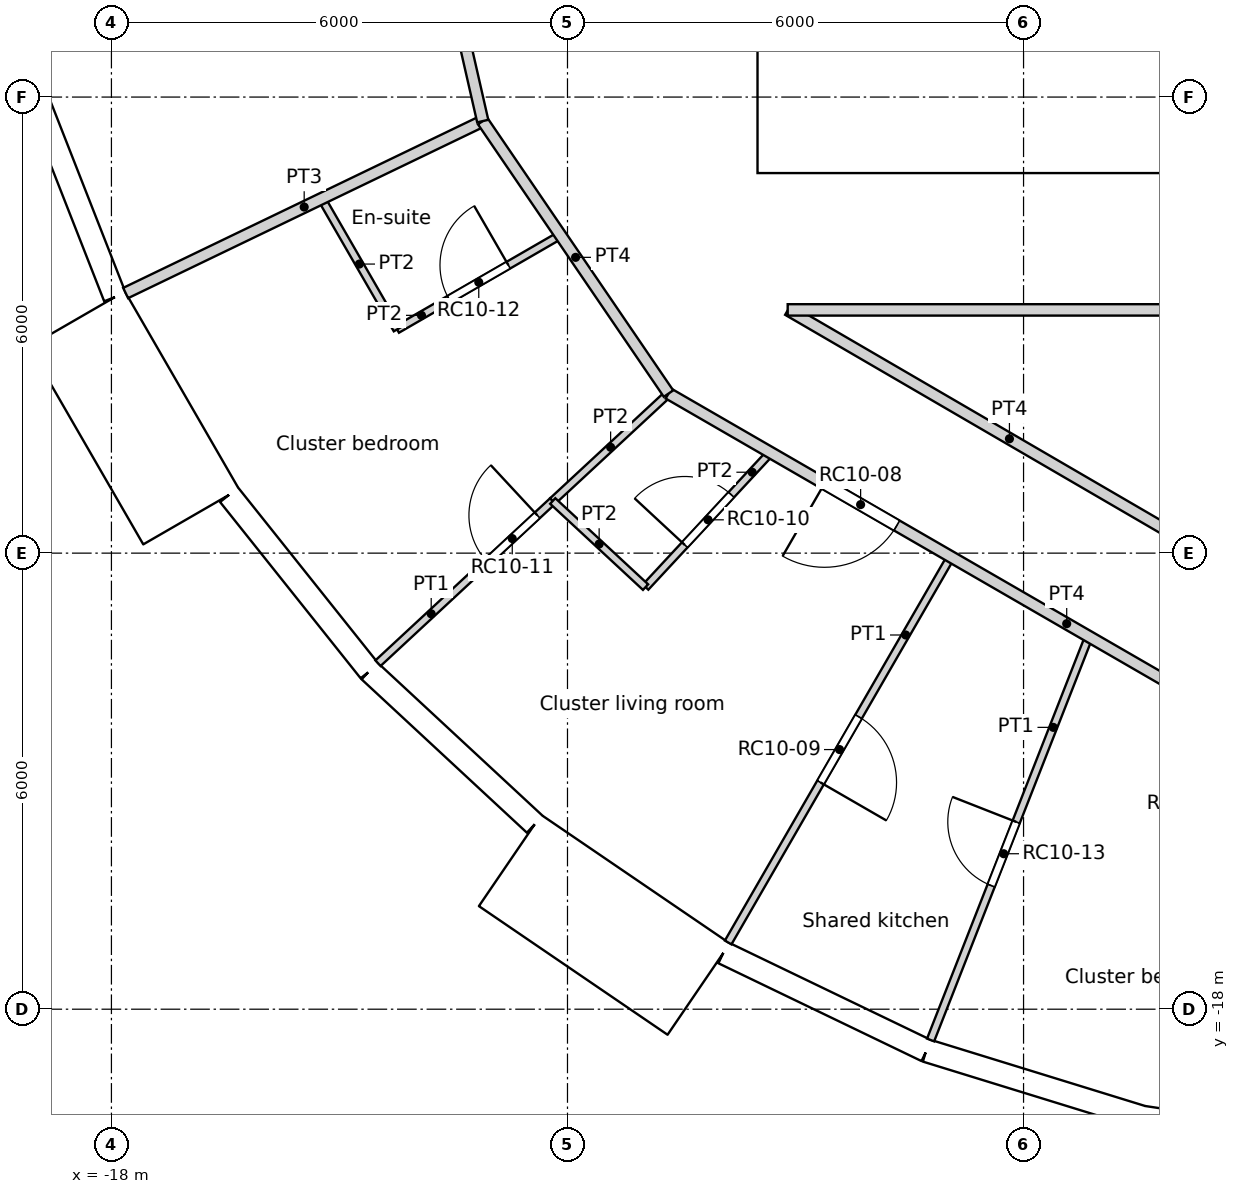
"""IFC4 building model, lengths in metres.
Left out: names, types, materials, properties, quantities, classifications, styles, units other than length and angle.
Written with IfcOpenShell. Run it as: python <this file> out.ifc"""

import sys

from ifc_helpers import new_model, si_unit, direction, frame, frame_2d, origin, origin_2d, place, context, subcontext, project, spatial, rectangle, circle, extrude, element, fill, save


model = new_model("IFC4")
c1 = context("Model", 3, precision=1e-05, world=origin(), true_north=direction((0.0, 1.0)))
c2 = subcontext(c1, "Body", "Model", "MODEL_VIEW")
j1 = project(units=[si_unit("LENGTHUNIT", "METRE"), si_unit("PLANEANGLEUNIT", "RADIAN")], contexts=[c1])
p1 = place(None, origin())
s1 = spatial("IfcSite", under=j1, at=p1, CompositionType="ELEMENT")
p2 = place(p1, origin())
s2 = spatial("IfcBuilding", under=s1, at=p2, CompositionType="ELEMENT")
p3 = place(p2, frame((0.0, 0.0, 323.4)))
s3 = spatial("IfcBuildingStorey", under=s2, at=p3, CompositionType="ELEMENT", Elevation=323.4)
for number, where, z_axis, x_axis in (
    (1, (-16.958, -8.167, 0.0), (0.0, 0.0, 1.0), (1.0, 0.0, 0.0)),
    (2, (-13.798, -12.802, 0.0), (0.0, 0.0, 1.0), (1.0, 0.0, 0.0)),
    (3, (-9.411, -16.301, 0.0), (0.0, 0.0, 1.0), (1.0, 0.0, 0.0)),
    (4, (-4.188, -18.35, 0.0), (0.0, 0.0, 1.0), (1.0, 0.0, 0.0)),
):
    element("IfcColumn", number, at=place(p3, frame(where, z_axis=z_axis, x_axis=x_axis)), inside=s3, PredefinedType="COLUMN", context=c2, shape_type="SweptSolid", body=[
        extrude(circle(Radius=0.45, at=origin_2d()), origin(), (0.0, 0.0, 1.0), 3.6),
    ])
p4 = place(p3, frame((-19.037, -5.872, 0.0), z_axis=(0.0, 0.0, 1.0), x_axis=(0.36530043032, -0.930889679612, 0.0)))
e5 = element("IfcWall", 5, at=p4, inside=s3, PredefinedType="SOLIDWALL", context=c2, shape_type="SweptSolid", body=[
    extrude(rectangle(XDim=2.962, YDim=0.3, at=frame_2d((1.481, 0.0))), origin(), (0.0, 0.0, 1.0), 3.25),
])
p5 = place(p4, frame((1.481, 0.0, 1.55)))
e6 = element("IfcOpeningElement", 6, at=p5, cuts=e5, PredefinedType="OPENING", context=c2, shape_type="SweptSolid", body=[
    extrude(circle(Radius=0.9, at=origin_2d()), frame((0.0, 0.16, 0.0), z_axis=(0.0, -1.0, 0.0), x_axis=(1.0, 0.0, 0.0)), (0.0, 0.0, 1.0), 0.32),
])
p6 = place(p3, frame((-18.452, -8.921, -0.35), z_axis=(0.0, 0.0, 1.0), x_axis=(0.499990139034, -0.866031096941, 0.0)))
e7 = element("IfcWall", 7, at=p6, inside=s3, PredefinedType="ELEMENTEDWALL", context=c2, shape_type="SweptSolid", body=[
    extrude(rectangle(XDim=3.0, YDim=1.45, at=frame_2d((1.5, 0.0))), origin(), (0.0, 0.0, 1.0), 3.6),
])
p7 = place(p6, frame((1.5, 0.0, 1.9)))
e8 = element("IfcOpeningElement", 8, at=p7, cuts=e7, PredefinedType="OPENING", context=c2, shape_type="SweptSolid", body=[
    extrude(circle(Radius=0.9, at=origin_2d()), frame((0.0, 0.735, 0.0), z_axis=(0.0, -1.0, 0.0), x_axis=(1.0, 0.0, 0.0)), (0.0, 0.0, 1.0), 1.47),
])
p8 = place(p3, frame((-16.451, -11.234, 0.0), z_axis=(0.0, 0.0, 1.0), x_axis=(0.623498236992, -0.781824755599, 0.0)))
e9 = element("IfcWall", 9, at=p8, inside=s3, PredefinedType="SOLIDWALL", context=c2, shape_type="SweptSolid", body=[
    extrude(rectangle(XDim=2.962, YDim=0.3, at=frame_2d((1.481, 0.0))), origin(), (0.0, 0.0, 1.0), 3.25),
])
p9 = place(p8, frame((1.481, 0.0, 1.55)))
e10 = element("IfcOpeningElement", 10, at=p9, cuts=e9, PredefinedType="OPENING", context=c2, shape_type="SweptSolid", body=[
    extrude(circle(Radius=0.9, at=origin_2d()), frame((0.0, 0.16, 0.0), z_axis=(0.0, -1.0, 0.0), x_axis=(1.0, 0.0, 0.0)), (0.0, 0.0, 1.0), 0.32),
])
p10 = place(p3, frame((-14.604, -13.55, 0.0), z_axis=(0.0, 0.0, 1.0), x_axis=(0.733066412643, -0.680157066165, 0.0)))
e11 = element("IfcWall", 11, at=p10, inside=s3, PredefinedType="SOLIDWALL", context=c2, shape_type="SweptSolid", body=[
    extrude(rectangle(XDim=2.962, YDim=0.3, at=frame_2d((1.481, 0.0))), origin(), (0.0, 0.0, 1.0), 3.25),
])
p11 = place(p10, frame((1.481, 0.0, 1.55)))
e12 = element("IfcOpeningElement", 12, at=p11, cuts=e11, PredefinedType="OPENING", context=c2, shape_type="SweptSolid", body=[
    extrude(circle(Radius=0.9, at=origin_2d()), frame((0.0, 0.16, 0.0), z_axis=(0.0, -1.0, 0.0), x_axis=(1.0, 0.0, 0.0)), (0.0, 0.0, 1.0), 0.32),
])
p12 = place(p3, frame((-12.754, -16.044, -0.35), z_axis=(0.0, 0.0, 1.0), x_axis=(0.826246281157, -0.563309047392, 0.0)))
e13 = element("IfcWall", 13, at=p12, inside=s3, PredefinedType="ELEMENTEDWALL", context=c2, shape_type="SweptSolid", body=[
    extrude(rectangle(XDim=3.0, YDim=1.45, at=frame_2d((1.5, 0.0))), origin(), (0.0, 0.0, 1.0), 3.6),
])
p13 = place(p12, frame((1.5, 0.0, 1.9)))
e14 = element("IfcOpeningElement", 14, at=p13, cuts=e13, PredefinedType="OPENING", context=c2, shape_type="SweptSolid", body=[
    extrude(circle(Radius=0.9, at=origin_2d()), frame((0.0, 0.735, 0.0), z_axis=(0.0, -1.0, 0.0), x_axis=(1.0, 0.0, 0.0)), (0.0, 0.0, 1.0), 1.47),
])
p14 = place(p3, frame((-9.947, -17.259, 0.0), z_axis=(0.0, 0.0, 1.0), x_axis=(0.900939615635, -0.433944476838, 0.0)))
e15 = element("IfcWall", 15, at=p14, inside=s3, PredefinedType="SOLIDWALL", context=c2, shape_type="SweptSolid", body=[
    extrude(rectangle(XDim=2.962, YDim=0.3, at=frame_2d((1.481, 0.0))), origin(), (0.0, 0.0, 1.0), 3.25),
])
p15 = place(p14, frame((1.481, 0.0, 1.55)))
e16 = element("IfcOpeningElement", 16, at=p15, cuts=e15, PredefinedType="OPENING", context=c2, shape_type="SweptSolid", body=[
    extrude(circle(Radius=0.9, at=origin_2d()), frame((0.0, 0.16, 0.0), z_axis=(0.0, -1.0, 0.0), x_axis=(1.0, 0.0, 0.0)), (0.0, 0.0, 1.0), 0.32),
])
p16 = place(p3, frame((-7.278, -18.545, 0.0), z_axis=(0.0, 0.0, 1.0), x_axis=(0.95558635705, -0.294711238707, 0.0)))
e17 = element("IfcWall", 17, at=p16, inside=s3, PredefinedType="SOLIDWALL", context=c2, shape_type="SweptSolid", body=[
    extrude(rectangle(XDim=2.962, YDim=0.3, at=frame_2d((1.481, 0.0))), origin(), (0.0, 0.0, 1.0), 3.25),
])
p17 = place(p16, frame((1.481, 0.0, 1.55)))
e18 = element("IfcOpeningElement", 18, at=p17, cuts=e17, PredefinedType="OPENING", context=c2, shape_type="SweptSolid", body=[
    extrude(circle(Radius=0.9, at=origin_2d()), frame((0.0, 0.16, 0.0), z_axis=(0.0, -1.0, 0.0), x_axis=(1.0, 0.0, 0.0)), (0.0, 0.0, 1.0), 0.32),
])
p18 = place(p3, frame((-4.53, -19.989, -0.35), z_axis=(0.0, 0.0, 1.0), x_axis=(0.988836445254, -0.149004981587, 0.0)))
e19 = element("IfcWall", 19, at=p18, inside=s3, PredefinedType="ELEMENTEDWALL", context=c2, shape_type="SweptSolid", body=[
    extrude(rectangle(XDim=3.0, YDim=1.45, at=frame_2d((1.5, 0.0))), origin(), (0.0, 0.0, 1.0), 3.6),
])
p19 = place(p18, frame((1.5, 0.0, 1.9)))
e20 = element("IfcOpeningElement", 20, at=p19, cuts=e19, PredefinedType="OPENING", context=c2, shape_type="SweptSolid", body=[
    extrude(circle(Radius=0.9, at=origin_2d()), frame((0.0, 0.735, 0.0), z_axis=(0.0, -1.0, 0.0), x_axis=(1.0, 0.0, 0.0)), (0.0, 0.0, 1.0), 1.47),
])
p20 = place(p3, frame((-9.5, -6.7, 0.0), z_axis=(0.0, 0.0, 1.0), x_axis=(1.0, 0.0, 0.0)))
e21 = element("IfcWall", 21, at=p20, inside=s3, PredefinedType="SOLIDWALL", context=c2, shape_type="SweptSolid", body=[
    extrude(rectangle(XDim=19.0, YDim=0.6, at=frame_2d((9.5, 0.0))), origin(), (0.0, 0.0, 1.0), 3.6),
])
p21 = place(p20, frame((10.4, 0.0, 0.0)))
e22 = element("IfcOpeningElement", 22, at=p21, cuts=e21, PredefinedType="OPENING", context=c2, shape_type="SweptSolid", body=[
    extrude(rectangle(XDim=1.0, YDim=2.1, at=frame_2d((0.5, 1.05))), frame((0.0, 0.3, 0.0), z_axis=(0.0, -1.0, 0.0), x_axis=(1.0, 0.0, 0.0)), (0.0, 0.0, 1.0), 0.6),
])
p22 = place(p20, frame((5.35, 0.0, 0.0)))
e23 = element("IfcOpeningElement", 23, at=p22, cuts=e21, PredefinedType="OPENING", context=c2, shape_type="SweptSolid", body=[
    extrude(rectangle(XDim=1.7, YDim=2.1, at=frame_2d((0.85, 1.05))), frame((0.0, 0.3, 0.0), z_axis=(0.0, -1.0, 0.0), x_axis=(1.0, 0.0, 0.0)), (0.0, 0.0, 1.0), 0.6),
])
p23 = place(p20, frame((11.95, 0.0, 0.0)))
e24 = element("IfcOpeningElement", 24, at=p23, cuts=e21, PredefinedType="OPENING", context=c2, shape_type="SweptSolid", body=[
    extrude(rectangle(XDim=1.7, YDim=2.1, at=frame_2d((0.85, 1.05))), frame((0.0, 0.3, 0.0), z_axis=(0.0, -1.0, 0.0), x_axis=(1.0, 0.0, 0.0)), (0.0, 0.0, 1.0), 0.6),
])
p24 = place(p3, frame((-9.2, -6.4, 0.0), z_axis=(0.0, 0.0, 1.0), x_axis=(0.0, 1.0, 0.0)))
e25 = element("IfcWall", 25, at=p24, inside=s3, PredefinedType="SOLIDWALL", context=c2, shape_type="SweptSolid", body=[
    extrude(rectangle(XDim=12.8, YDim=0.6, at=frame_2d((6.4, 0.0))), origin(), (0.0, 0.0, 1.0), 3.6),
])
p25 = place(p3, frame((-9.103, -8.8, 0.0), z_axis=(0.0, 0.0, 1.0), x_axis=(1.0, 0.0, 0.0)))
e26 = element("IfcWall", 26, at=p25, inside=s3, PredefinedType="PARTITIONING", context=c2, shape_type="SweptSolid", body=[
    extrude(rectangle(XDim=18.204, YDim=0.15, at=frame_2d((9.102, 0.0))), origin(), (0.0, 0.0, 1.0), 3.25),
])
p26 = place(p25, frame((8.597, 0.0, 0.0)))
e27 = element("IfcOpeningElement", 27, at=p26, cuts=e26, PredefinedType="OPENING", context=c2, shape_type="SweptSolid", body=[
    extrude(rectangle(XDim=1.0, YDim=2.04, at=frame_2d((0.5, 1.02))), frame((0.0, 0.075, 0.0), z_axis=(0.0, -1.0, 0.0), x_axis=(1.0, 0.0, 0.0)), (0.0, 0.0, 1.0), 0.15),
])
p27 = place(p3, frame((-9.099, -8.8, 0.0), z_axis=(0.0, 0.0, 1.0), x_axis=(0.864286794128, -0.502999341447, 0.0)))
e28 = element("IfcWall", 28, at=p27, inside=s3, PredefinedType="PARTITIONING", context=c2, shape_type="SweptSolid", body=[
    extrude(rectangle(XDim=6.741, YDim=0.15, at=frame_2d((3.371, 0.0))), origin(), (0.0, 0.0, 1.0), 3.25),
])
p28 = place(p3, frame((-14.557, 0.0, 0.0), z_axis=(0.0, 0.0, 1.0), x_axis=(0.222568978642, -0.97491694505, 0.0)))
e29 = element("IfcWall", 29, at=p28, inside=s3, PredefinedType="PARTITIONING", context=c2, shape_type="SweptSolid", body=[
    extrude(rectangle(XDim=6.479, YDim=0.15, at=frame_2d((3.239, 0.0))), origin(), (0.0, 0.0, 1.0), 3.25),
])
p29 = place(p28, frame((2.74, 0.0, 0.0)))
e30 = element("IfcOpeningElement", 30, at=p29, cuts=e29, PredefinedType="OPENING", context=c2, shape_type="SweptSolid", body=[
    extrude(rectangle(XDim=1.0, YDim=2.04, at=frame_2d((0.5, 1.02))), frame((0.0, 0.075, 0.0), z_axis=(0.0, -1.0, 0.0), x_axis=(1.0, 0.0, 0.0)), (0.0, 0.0, 1.0), 0.15),
])
p30 = place(p3, frame((-10.671, -9.901, 0.0), z_axis=(0.0, 0.0, 1.0), x_axis=(0.865823993551, -0.500348690606, 0.0)))
e31 = element("IfcWall", 31, at=p30, inside=s3, PredefinedType="PARTITIONING", context=c2, shape_type="SweptSolid", body=[
    extrude(rectangle(XDim=8.582, YDim=0.15, at=frame_2d((4.291, 0.0))), origin(), (0.0, 0.0, 1.0), 3.25),
])
p31 = place(p30, frame((2.369, 0.0, 0.0)))
e32 = element("IfcOpeningElement", 32, at=p31, cuts=e31, PredefinedType="OPENING", context=c2, shape_type="SweptSolid", body=[
    extrude(rectangle(XDim=1.1, YDim=2.1, at=frame_2d((0.55, 1.05))), frame((0.0, 0.075, 0.0), z_axis=(0.0, -1.0, 0.0), x_axis=(1.0, 0.0, 0.0)), (0.0, 0.0, 1.0), 0.15),
])
p32 = place(p3, frame((-13.115, -6.316, 0.0), z_axis=(0.0, 0.0, 1.0), x_axis=(0.563434599286, -0.826160669802, 0.0)))
e33 = element("IfcWall", 33, at=p32, inside=s3, PredefinedType="PARTITIONING", context=c2, shape_type="SweptSolid", body=[
    extrude(rectangle(XDim=4.339, YDim=0.15, at=frame_2d((2.169, 0.0))), origin(), (0.0, 0.0, 1.0), 3.25),
])
p33 = place(p3, frame((-17.813, -8.578, 0.0), z_axis=(0.0, 0.0, 1.0), x_axis=(0.9009772659, 0.433866300064, 0.0)))
e34 = element("IfcWall", 34, at=p33, inside=s3, PredefinedType="PARTITIONING", context=c2, shape_type="SweptSolid", body=[
    extrude(rectangle(XDim=5.214, YDim=0.15, at=frame_2d((2.607, 0.0))), origin(), (0.0, 0.0, 1.0), 3.25),
])
p34 = place(p3, frame((-9.886, -17.122, 0.0), z_axis=(0.0, 0.0, 1.0), x_axis=(0.500022903925, 0.866012179793, 0.0)))
e35 = element("IfcWall", 35, at=p34, inside=s3, PredefinedType="PARTITIONING", context=c2, shape_type="SweptSolid", body=[
    extrude(rectangle(XDim=5.862, YDim=0.1, at=frame_2d((2.931, 0.0))), origin(), (0.0, 0.0, 1.0), 3.25),
])
p35 = place(p34, frame((2.43, 0.0, 0.0)))
e36 = element("IfcOpeningElement", 36, at=p35, cuts=e35, PredefinedType="OPENING", context=c2, shape_type="SweptSolid", body=[
    extrude(rectangle(XDim=1.0, YDim=2.04, at=frame_2d((0.5, 1.02))), frame((0.0, 0.05, 0.0), z_axis=(0.0, -1.0, 0.0), x_axis=(1.0, 0.0, 0.0)), (0.0, 0.0, 1.0), 0.1),
])
p36 = place(p3, frame((-12.194, -11.314, 0.0), z_axis=(0.0, 0.0, 1.0), x_axis=(0.733064860014, -0.680158739569, 0.0)))
e37 = element("IfcWall", 37, at=p36, inside=s3, PredefinedType="PARTITIONING", context=c2, shape_type="SweptSolid", body=[
    extrude(rectangle(XDim=1.666, YDim=0.1, at=frame_2d((0.833, 0.0))), origin(), (0.0, 0.0, 1.0), 3.25),
])
p37 = place(p3, frame((-10.973, -12.447, 0.0), z_axis=(0.0, 0.0, 1.0), x_axis=(0.680296065293, 0.732937421303, 0.0)))
e38 = element("IfcWall", 38, at=p37, inside=s3, PredefinedType="PARTITIONING", context=c2, shape_type="SweptSolid", body=[
    extrude(rectangle(XDim=2.416, YDim=0.1, at=frame_2d((1.208, 0.0))), origin(), (0.0, 0.0, 1.0), 3.25),
])
p38 = place(p37, frame((0.758, 0.0, 0.0)))
e39 = element("IfcOpeningElement", 39, at=p38, cuts=e38, PredefinedType="OPENING", context=c2, shape_type="SweptSolid", body=[
    extrude(rectangle(XDim=0.9, YDim=2.0, at=frame_2d((0.45, 1.0))), frame((0.0, 0.05, 0.0), z_axis=(0.0, -1.0, 0.0), x_axis=(1.0, 0.0, 0.0)), (0.0, 0.0, 1.0), 0.1),
])
p39 = place(p3, frame((-14.493, -13.448, 0.0), z_axis=(0.0, 0.0, 1.0), x_axis=(0.732887738731, 0.680349588387, 0.0)))
e40 = element("IfcWall", 40, at=p39, inside=s3, PredefinedType="PARTITIONING", context=c2, shape_type="SweptSolid", body=[
    extrude(rectangle(XDim=3.137, YDim=0.1, at=frame_2d((1.568, 0.0))), origin(), (0.0, 0.0, 1.0), 3.25),
])
p40 = place(p39, frame((1.96, 0.0, 0.0)))
e41 = element("IfcOpeningElement", 41, at=p40, cuts=e40, PredefinedType="OPENING", context=c2, shape_type="SweptSolid", body=[
    extrude(rectangle(XDim=0.9, YDim=2.1, at=frame_2d((0.45, 1.05))), frame((0.0, 0.05, 0.0), z_axis=(0.0, -1.0, 0.0), x_axis=(1.0, 0.0, 0.0)), (0.0, 0.0, 1.0), 0.1),
])
p41 = place(p3, frame((-7.223, -18.405, 0.0), z_axis=(0.0, 0.0, 1.0), x_axis=(0.365331902423, 0.930877328691, 0.0)))
e42 = element("IfcWall", 42, at=p41, inside=s3, PredefinedType="PARTITIONING", context=c2, shape_type="SweptSolid", body=[
    extrude(rectangle(XDim=5.704, YDim=0.1, at=frame_2d((2.852, 0.0))), origin(), (0.0, 0.0, 1.0), 3.25),
])
p42 = place(p41, frame((2.182, 0.0, 0.0)))
e43 = element("IfcOpeningElement", 43, at=p42, cuts=e42, PredefinedType="OPENING", context=c2, shape_type="SweptSolid", body=[
    extrude(rectangle(XDim=0.9, YDim=2.1, at=frame_2d((0.45, 1.05))), frame((0.0, 0.05, 0.0), z_axis=(0.0, -1.0, 0.0), x_axis=(1.0, 0.0, 0.0)), (0.0, 0.0, 1.0), 0.1),
])
p43 = place(p3, frame((-12.194, -11.314, 0.0), z_axis=(0.0, 0.0, 1.0), x_axis=(0.733107294142, 0.680113001843, 0.0)))
e44 = element("IfcWall", 44, at=p43, inside=s3, PredefinedType="PARTITIONING", context=c2, shape_type="SweptSolid", body=[
    extrude(rectangle(XDim=2.078, YDim=0.1, at=frame_2d((1.039, 0.0))), origin(), (0.0, 0.0, 1.0), 3.25),
])
p44 = place(p3, frame((-15.235, -7.337, 0.0), z_axis=(0.0, 0.0, 1.0), x_axis=(0.50005230485, -0.865995203459, 0.0)))
e45 = element("IfcWall", 45, at=p44, inside=s3, PredefinedType="PARTITIONING", context=c2, shape_type="SweptSolid", body=[
    extrude(rectangle(XDim=1.986, YDim=0.1, at=frame_2d((0.993, 0.0))), origin(), (0.0, 0.0, 1.0), 3.25),
])
p45 = place(p3, frame((-14.242, -9.057, 0.0), z_axis=(0.0, 0.0, 1.0), x_axis=(0.865975856927, 0.500085807857, 0.0)))
e46 = element("IfcWall", 46, at=p45, inside=s3, PredefinedType="PARTITIONING", context=c2, shape_type="SweptSolid", body=[
    extrude(rectangle(XDim=2.481, YDim=0.1, at=frame_2d((1.241, 0.0))), origin(), (0.0, 0.0, 1.0), 3.25),
])
p46 = place(p45, frame((0.791, 0.0, 0.0)))
e47 = element("IfcOpeningElement", 47, at=p46, cuts=e46, PredefinedType="OPENING", context=c2, shape_type="SweptSolid", body=[
    extrude(rectangle(XDim=0.9, YDim=2.04, at=frame_2d((0.45, 1.02))), frame((0.0, 0.05, 0.0), z_axis=(0.0, -1.0, 0.0), x_axis=(1.0, 0.0, 0.0)), (0.0, 0.0, 1.0), 0.1),
])
p47 = place(p5, origin())
e48 = element("IfcWindow", 48, at=p47, inside=s3, PartitioningType="SINGLE_PANEL", PredefinedType="WINDOW", context=c2, shape_type="SweptSolid", body=[
    extrude(circle(Radius=0.9, at=origin_2d()), frame((0.0, 0.12, 0.0), z_axis=(0.0, -1.0, 0.0), x_axis=(1.0, 0.0, 0.0)), (0.0, 0.0, 1.0), 0.1),
])
fill(e6, e48)
p48 = place(p7, origin())
e49 = element("IfcWindow", 49, at=p48, inside=s3, PartitioningType="SINGLE_PANEL", PredefinedType="WINDOW", context=c2, shape_type="SweptSolid", body=[
    extrude(circle(Radius=0.9, at=origin_2d()), frame((0.0, 0.695, 0.0), z_axis=(0.0, -1.0, 0.0), x_axis=(1.0, 0.0, 0.0)), (0.0, 0.0, 1.0), 0.1),
])
fill(e8, e49)
p49 = place(p9, origin())
e50 = element("IfcWindow", 50, at=p49, inside=s3, PartitioningType="SINGLE_PANEL", PredefinedType="WINDOW", context=c2, shape_type="SweptSolid", body=[
    extrude(circle(Radius=0.9, at=origin_2d()), frame((0.0, 0.12, 0.0), z_axis=(0.0, -1.0, 0.0), x_axis=(1.0, 0.0, 0.0)), (0.0, 0.0, 1.0), 0.1),
])
fill(e10, e50)
p50 = place(p11, origin())
e51 = element("IfcWindow", 51, at=p50, inside=s3, PartitioningType="SINGLE_PANEL", PredefinedType="WINDOW", context=c2, shape_type="SweptSolid", body=[
    extrude(circle(Radius=0.9, at=origin_2d()), frame((0.0, 0.12, 0.0), z_axis=(0.0, -1.0, 0.0), x_axis=(1.0, 0.0, 0.0)), (0.0, 0.0, 1.0), 0.1),
])
fill(e12, e51)
p51 = place(p13, origin())
e52 = element("IfcWindow", 52, at=p51, inside=s3, PartitioningType="SINGLE_PANEL", PredefinedType="WINDOW", context=c2, shape_type="SweptSolid", body=[
    extrude(circle(Radius=0.9, at=origin_2d()), frame((0.0, 0.695, 0.0), z_axis=(0.0, -1.0, 0.0), x_axis=(1.0, 0.0, 0.0)), (0.0, 0.0, 1.0), 0.1),
])
fill(e14, e52)
p52 = place(p15, origin())
e53 = element("IfcWindow", 53, at=p52, inside=s3, PartitioningType="SINGLE_PANEL", PredefinedType="WINDOW", context=c2, shape_type="SweptSolid", body=[
    extrude(circle(Radius=0.9, at=origin_2d()), frame((0.0, 0.12, 0.0), z_axis=(0.0, -1.0, 0.0), x_axis=(1.0, 0.0, 0.0)), (0.0, 0.0, 1.0), 0.1),
])
fill(e16, e53)
p53 = place(p17, origin())
e54 = element("IfcWindow", 54, at=p53, inside=s3, PartitioningType="SINGLE_PANEL", PredefinedType="WINDOW", context=c2, shape_type="SweptSolid", body=[
    extrude(circle(Radius=0.9, at=origin_2d()), frame((0.0, 0.12, 0.0), z_axis=(0.0, -1.0, 0.0), x_axis=(1.0, 0.0, 0.0)), (0.0, 0.0, 1.0), 0.1),
])
fill(e18, e54)
p54 = place(p31, origin())
e55 = element("IfcDoor", 55, at=p54, inside=s3, OperationType="SINGLE_SWING_RIGHT", PredefinedType="DOOR", context=c2, shape_type="SweptSolid", body=[
    extrude(rectangle(XDim=1.1, YDim=2.1, at=frame_2d((0.55, 1.05))), frame((0.0, 0.025, 0.0), z_axis=(0.0, -1.0, 0.0), x_axis=(1.0, 0.0, 0.0)), (0.0, 0.0, 1.0), 0.05),
])
fill(e32, e55)
p55 = place(p35, origin())
e56 = element("IfcDoor", 56, at=p55, inside=s3, OperationType="SINGLE_SWING_RIGHT", PredefinedType="DOOR", context=c2, shape_type="SweptSolid", body=[
    extrude(rectangle(XDim=1.0, YDim=2.04, at=frame_2d((0.5, 1.02))), frame((0.0, 0.025, 0.0), z_axis=(0.0, -1.0, 0.0), x_axis=(1.0, 0.0, 0.0)), (0.0, 0.0, 1.0), 0.05),
])
fill(e36, e56)
p56 = place(p38, origin())
e57 = element("IfcDoor", 57, at=p56, inside=s3, OperationType="SINGLE_SWING_LEFT", PredefinedType="DOOR", context=c2, shape_type="SweptSolid", body=[
    extrude(rectangle(XDim=0.9, YDim=2.0, at=frame_2d((0.45, 1.0))), frame((0.0, 0.025, 0.0), z_axis=(0.0, -1.0, 0.0), x_axis=(1.0, 0.0, 0.0)), (0.0, 0.0, 1.0), 0.05),
])
fill(e39, e57)
p57 = place(p40, origin())
e58 = element("IfcDoor", 58, at=p57, inside=s3, OperationType="SINGLE_SWING_RIGHT", PredefinedType="DOOR", context=c2, shape_type="SweptSolid", body=[
    extrude(rectangle(XDim=0.9, YDim=2.1, at=frame_2d((0.45, 1.05))), frame((0.0, 0.025, 0.0), z_axis=(0.0, -1.0, 0.0), x_axis=(1.0, 0.0, 0.0)), (0.0, 0.0, 1.0), 0.05),
])
fill(e41, e58)
p58 = place(p46, origin())
e59 = element("IfcDoor", 59, at=p58, inside=s3, OperationType="SINGLE_SWING_RIGHT", PredefinedType="DOOR", context=c2, shape_type="SweptSolid", body=[
    extrude(rectangle(XDim=0.9, YDim=2.04, at=frame_2d((0.45, 1.02))), frame((0.0, 0.025, 0.0), z_axis=(0.0, -1.0, 0.0), x_axis=(1.0, 0.0, 0.0)), (0.0, 0.0, 1.0), 0.05),
])
fill(e47, e59)
p59 = place(p42, origin())
e60 = element("IfcDoor", 60, at=p59, inside=s3, OperationType="SINGLE_SWING_RIGHT", PredefinedType="DOOR", context=c2, shape_type="SweptSolid", body=[
    extrude(rectangle(XDim=0.9, YDim=2.1, at=frame_2d((0.45, 1.05))), frame((0.0, 0.025, 0.0), z_axis=(0.0, -1.0, 0.0), x_axis=(1.0, 0.0, 0.0)), (0.0, 0.0, 1.0), 0.05),
])
fill(e43, e60)
save(model, sys.argv[1])
